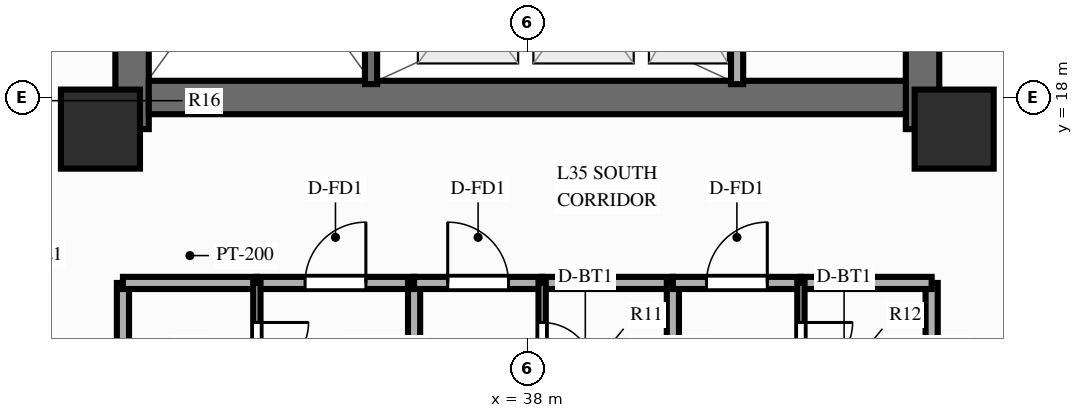
"""IFC4 building model, lengths in metres.
Left out: names, types, materials, properties, quantities, classifications, styles, units other than length and angle.
Written with IfcOpenShell. Run it as: python <this file> out.ifc"""

import sys

from ifc_helpers import new_model, si_unit, direction, frame, frame_2d, origin, origin_2d, place, context, subcontext, project, spatial, rectangle, extrude, source, transform, mapped, element, fill, save


model = new_model("IFC4")
c1 = context("Model", 3, precision=1e-05, world=origin(), true_north=direction((0.0, 1.0)))
c2 = subcontext(c1, "Body", "Model", "MODEL_VIEW")
j1 = project(units=[si_unit("LENGTHUNIT", "METRE"), si_unit("PLANEANGLEUNIT", "RADIAN")], contexts=[c1])
p1 = place(None, origin())
s1 = spatial("IfcSite", under=j1, at=p1, CompositionType="ELEMENT")
p2 = place(p1, origin())
s2 = spatial("IfcBuilding", under=s1, at=p2, CompositionType="ELEMENT")
p3 = place(p2, frame((0.0, 0.0, 110.85)))
s3 = spatial("IfcBuildingStorey", under=s2, at=p3, CompositionType="ELEMENT", Elevation=110.85)
p4 = place(p3, frame((31.5, 17.48, 0.0), z_axis=(0.0, 0.0, 1.0), x_axis=(0.0, 1.0, 0.0)))
e1 = element("IfcWall", 1, at=p4, inside=s3, PredefinedType="SHEAR", context=c2, shape_type="SweptSolid", body=[
    extrude(rectangle(XDim=19.04, YDim=0.55, at=frame_2d((9.52, 0.0))), origin(), (0.0, 0.0, 1.0), 3.0),
])
p5 = place(p4, frame((6.32, 0.0, 0.0)))
e2 = element("IfcOpeningElement", 2, at=p5, cuts=e1, PredefinedType="OPENING", context=c2, shape_type="SweptSolid", body=[
    extrude(rectangle(XDim=1.1, YDim=2.15, at=frame_2d((0.55, 1.075))), frame((0.0, 0.287, 0.0), z_axis=(0.0, -1.0, 0.0), x_axis=(1.0, 0.0, 0.0)), (0.0, 0.0, 1.0), 0.574),
])
p6 = place(p3, frame((44.5, 17.48, 0.0), z_axis=(0.0, 0.0, 1.0), x_axis=(0.0, 1.0, 0.0)))
e3 = element("IfcWall", 3, at=p6, inside=s3, PredefinedType="SHEAR", context=c2, shape_type="SweptSolid", body=[
    extrude(rectangle(XDim=19.04, YDim=0.55, at=frame_2d((9.52, 0.0))), origin(), (0.0, 0.0, 1.0), 3.0),
])
p7 = place(p6, frame((12.67, 0.0, 0.0), z_axis=(0.0, 0.0, 1.0), x_axis=(-1.0, 0.0, 0.0)))
e4 = element("IfcOpeningElement", 4, at=p7, cuts=e3, PredefinedType="OPENING", context=c2, shape_type="SweptSolid", body=[
    extrude(rectangle(XDim=1.1, YDim=2.15, at=frame_2d((0.55, 1.075))), frame((0.0, 0.287, 0.0), z_axis=(0.0, -1.0, 0.0), x_axis=(1.0, 0.0, 0.0)), (0.0, 0.0, 1.0), 0.574),
])
p8 = place(p3, frame((31.775, 18.0, 0.0), z_axis=(0.0, 0.0, 1.0), x_axis=(1.0, 0.0, 0.0)))
e5 = element("IfcWall", 5, at=p8, inside=s3, PredefinedType="SHEAR", context=c2, shape_type="SweptSolid", body=[
    extrude(rectangle(XDim=12.45, YDim=0.55, at=frame_2d((6.225, 0.0))), origin(), (0.0, 0.0, 1.0), 3.0),
])
m1 = source(origin(), c2, "Body", "SweptSolid", [
    extrude(rectangle(XDim=1.3, YDim=1.3, at=origin_2d()), origin(), (0.0, 0.0, 1.0), 3.0),
])
for number, where, z_axis, x_axis in (
    (6, (30.98, 17.48, 0.0), (0.0, 0.0, 1.0), (1.0, 0.0, 0.0)),
    (7, (45.02, 17.48, 0.0), (0.0, 0.0, 1.0), (1.0, 0.0, 0.0)),
):
    element("IfcColumn", number, at=place(p3, frame(where, z_axis=z_axis, x_axis=x_axis)), inside=s3, PredefinedType="COLUMN", context=c2, shape_type="MappedRepresentation", body=[
        mapped(m1, transform((0.0, 0.0, 0.0), scale=1.0)),
    ])
p9 = place(p3, frame((41.45, 18.22, 0.0), z_axis=(0.0, 0.0, 1.0), x_axis=(0.0, 1.0, 0.0)))
e8 = element("IfcWall", 8, at=p9, inside=s3, PredefinedType="PARTITIONING", context=c2, shape_type="SweptSolid", body=[
    extrude(rectangle(XDim=2.86, YDim=0.2, at=frame_2d((1.43, 0.0))), origin(), (0.0, 0.0, 1.0), 2.79),
])
p10 = place(p3, frame((35.43, 18.22, 0.0), z_axis=(0.0, 0.0, 1.0), x_axis=(0.0, 1.0, 0.0)))
e9 = element("IfcWall", 9, at=p10, inside=s3, PredefinedType="SOLIDWALL", context=c2, shape_type="SweptSolid", body=[
    extrude(rectangle(XDim=7.22, YDim=0.2, at=frame_2d((3.61, 0.0))), origin(), (0.0, 0.0, 1.0), 2.79),
])
p11 = place(p10, frame((6.68, 0.0, 0.0), z_axis=(0.0, 0.0, 1.0), x_axis=(-1.0, 0.0, 0.0)))
e10 = element("IfcOpeningElement", 10, at=p11, cuts=e9, PredefinedType="OPENING", context=c2, shape_type="SweptSolid", body=[
    extrude(rectangle(XDim=1.1, YDim=2.15, at=frame_2d((0.55, 1.075))), frame((0.0, 0.112, 0.0), z_axis=(0.0, -1.0, 0.0), x_axis=(1.0, 0.0, 0.0)), (0.0, 0.0, 1.0), 0.224),
])
for number, where, z_axis, x_axis in (
    (11, (31.35, 14.95, 0.0), (0.0, 0.0, 1.0), (0.0, -1.0, 0.0)),
    (12, (44.65, 14.95, 0.0), (0.0, 0.0, 1.0), (0.0, -1.0, 0.0)),
):
    element("IfcWall", number, at=place(p3, frame(where, z_axis=z_axis, x_axis=x_axis)), inside=s3, PredefinedType="PARTITIONING", context=c2, shape_type="SweptSolid", body=[
        extrude(rectangle(XDim=11.8, YDim=0.2, at=frame_2d((5.9, 0.0))), origin(), (0.0, 0.0, 1.0), 2.34),
    ])
p12 = place(p3, frame((31.35, 14.95, 0.0), z_axis=(0.0, 0.0, 1.0), x_axis=(1.0, 0.0, 0.0)))
e13 = element("IfcWall", 13, at=p12, inside=s3, PredefinedType="PARTITIONING", context=c2, shape_type="SweptSolid", body=[
    extrude(rectangle(XDim=2.202, YDim=0.2, at=frame_2d((1.101, 0.0))), origin(), (0.0, 0.0, 1.0), 2.79),
])
p13 = place(p3, frame((33.552, 14.95, 0.0), z_axis=(0.0, 0.0, 1.0), x_axis=(1.0, 0.0, 0.0)))
e14 = element("IfcWall", 14, at=p13, inside=s3, PredefinedType="PARTITIONING", context=c2, shape_type="SweptSolid", body=[
    extrude(rectangle(XDim=2.585, YDim=0.2, at=frame_2d((1.293, 0.0))), origin(), (0.0, 0.0, 1.0), 2.79),
])
p14 = place(p13, frame((0.793, 0.0, 0.0)))
e15 = element("IfcOpeningElement", 15, at=p14, cuts=e14, PredefinedType="OPENING", context=c2, shape_type="SweptSolid", body=[
    extrude(rectangle(XDim=1.0, YDim=2.15, at=frame_2d((0.5, 1.075))), frame((0.0, 0.112, 0.0), z_axis=(0.0, -1.0, 0.0), x_axis=(1.0, 0.0, 0.0)), (0.0, 0.0, 1.0), 0.224),
])
p15 = place(p3, frame((33.552, 14.95, 0.0), z_axis=(0.0, 0.0, 1.0), x_axis=(0.0, -1.0, 0.0)))
e16 = element("IfcWall", 16, at=p15, inside=s3, PredefinedType="PARTITIONING", context=c2, shape_type="SweptSolid", body=[
    extrude(rectangle(XDim=2.15, YDim=0.12, at=frame_2d((1.075, 0.0))), origin(), (0.0, 0.0, 1.0), 2.79),
])
p16 = place(p15, frame((0.65, 0.0, 0.0)))
e17 = element("IfcOpeningElement", 17, at=p16, cuts=e16, PredefinedType="OPENING", context=c2, shape_type="SweptSolid", body=[
    extrude(rectangle(XDim=0.85, YDim=2.05, at=frame_2d((0.425, 1.025))), frame((0.0, 0.072, 0.0), z_axis=(0.0, -1.0, 0.0), x_axis=(1.0, 0.0, 0.0)), (0.0, 0.0, 1.0), 0.144),
])
p17 = place(p3, frame((36.138, 14.95, 0.0), z_axis=(0.0, 0.0, 1.0), x_axis=(0.0, -1.0, 0.0)))
e18 = element("IfcWall", 18, at=p17, inside=s3, PredefinedType="PARTITIONING", context=c2, shape_type="SweptSolid", body=[
    extrude(rectangle(XDim=11.8, YDim=0.2, at=frame_2d((5.9, 0.0))), origin(), (0.0, 0.0, 1.0), 2.79),
])
p18 = place(p3, frame((36.138, 14.95, 0.0), z_axis=(0.0, 0.0, 1.0), x_axis=(1.0, 0.0, 0.0)))
e19 = element("IfcWall", 19, at=p18, inside=s3, PredefinedType="PARTITIONING", context=c2, shape_type="SweptSolid", body=[
    extrude(rectangle(XDim=2.106, YDim=0.2, at=frame_2d((1.053, 0.0))), origin(), (0.0, 0.0, 1.0), 2.79),
])
p19 = place(p18, frame((0.553, 0.0, 0.0)))
e20 = element("IfcOpeningElement", 20, at=p19, cuts=e19, PredefinedType="OPENING", context=c2, shape_type="SweptSolid", body=[
    extrude(rectangle(XDim=1.0, YDim=2.15, at=frame_2d((0.5, 1.075))), frame((0.0, 0.112, 0.0), z_axis=(0.0, -1.0, 0.0), x_axis=(1.0, 0.0, 0.0)), (0.0, 0.0, 1.0), 0.224),
])
p20 = place(p3, frame((38.244, 14.95, 0.0), z_axis=(0.0, 0.0, 1.0), x_axis=(1.0, 0.0, 0.0)))
e21 = element("IfcWall", 21, at=p20, inside=s3, PredefinedType="PARTITIONING", context=c2, shape_type="SweptSolid", body=[
    extrude(rectangle(XDim=2.15, YDim=0.2, at=frame_2d((1.075, 0.0))), origin(), (0.0, 0.0, 1.0), 2.79),
])
p21 = place(p3, frame((38.244, 14.95, 0.0), z_axis=(0.0, 0.0, 1.0), x_axis=(0.0, -1.0, 0.0)))
e22 = element("IfcWall", 22, at=p21, inside=s3, PredefinedType="PARTITIONING", context=c2, shape_type="SweptSolid", body=[
    extrude(rectangle(XDim=2.15, YDim=0.12, at=frame_2d((1.075, 0.0))), origin(), (0.0, 0.0, 1.0), 2.79),
])
p22 = place(p21, frame((0.65, 0.0, 0.0)))
e23 = element("IfcOpeningElement", 23, at=p22, cuts=e22, PredefinedType="OPENING", context=c2, shape_type="SweptSolid", body=[
    extrude(rectangle(XDim=0.85, YDim=2.05, at=frame_2d((0.425, 1.025))), frame((0.0, 0.072, 0.0), z_axis=(0.0, -1.0, 0.0), x_axis=(1.0, 0.0, 0.0)), (0.0, 0.0, 1.0), 0.144),
])
p23 = place(p3, frame((40.394, 14.95, 0.0), z_axis=(0.0, 0.0, 1.0), x_axis=(0.0, -1.0, 0.0)))
e24 = element("IfcWall", 24, at=p23, inside=s3, PredefinedType="PARTITIONING", context=c2, shape_type="SweptSolid", body=[
    extrude(rectangle(XDim=11.8, YDim=0.2, at=frame_2d((5.9, 0.0))), origin(), (0.0, 0.0, 1.0), 2.79),
])
p24 = place(p3, frame((40.394, 14.95, 0.0), z_axis=(0.0, 0.0, 1.0), x_axis=(1.0, 0.0, 0.0)))
e25 = element("IfcWall", 25, at=p24, inside=s3, PredefinedType="PARTITIONING", context=c2, shape_type="SweptSolid", body=[
    extrude(rectangle(XDim=2.106, YDim=0.2, at=frame_2d((1.053, 0.0))), origin(), (0.0, 0.0, 1.0), 2.79),
])
p25 = place(p24, frame((0.553, 0.0, 0.0)))
e26 = element("IfcOpeningElement", 26, at=p25, cuts=e25, PredefinedType="OPENING", context=c2, shape_type="SweptSolid", body=[
    extrude(rectangle(XDim=1.0, YDim=2.15, at=frame_2d((0.5, 1.075))), frame((0.0, 0.112, 0.0), z_axis=(0.0, -1.0, 0.0), x_axis=(1.0, 0.0, 0.0)), (0.0, 0.0, 1.0), 0.224),
])
p26 = place(p3, frame((42.5, 14.95, 0.0), z_axis=(0.0, 0.0, 1.0), x_axis=(1.0, 0.0, 0.0)))
e27 = element("IfcWall", 27, at=p26, inside=s3, PredefinedType="PARTITIONING", context=c2, shape_type="SweptSolid", body=[
    extrude(rectangle(XDim=2.15, YDim=0.2, at=frame_2d((1.075, 0.0))), origin(), (0.0, 0.0, 1.0), 2.79),
])
p27 = place(p3, frame((42.5, 14.95, 0.0), z_axis=(0.0, 0.0, 1.0), x_axis=(0.0, -1.0, 0.0)))
e28 = element("IfcWall", 28, at=p27, inside=s3, PredefinedType="PARTITIONING", context=c2, shape_type="SweptSolid", body=[
    extrude(rectangle(XDim=2.15, YDim=0.12, at=frame_2d((1.075, 0.0))), origin(), (0.0, 0.0, 1.0), 2.79),
])
p28 = place(p27, frame((0.65, 0.0, 0.0)))
e29 = element("IfcOpeningElement", 29, at=p28, cuts=e28, PredefinedType="OPENING", context=c2, shape_type="SweptSolid", body=[
    extrude(rectangle(XDim=0.85, YDim=2.05, at=frame_2d((0.425, 1.025))), frame((0.0, 0.072, 0.0), z_axis=(0.0, -1.0, 0.0), x_axis=(1.0, 0.0, 0.0)), (0.0, 0.0, 1.0), 0.144),
])
m2 = source(origin(), c2, "Body", "SweptSolid", [
    extrude(rectangle(XDim=1.0, YDim=2.15, at=frame_2d((0.5, 1.075))), frame((0.0, 0.025, 0.0), z_axis=(0.0, -1.0, 0.0), x_axis=(1.0, 0.0, 0.0)), (0.0, 0.0, 1.0), 0.05),
])
p29 = place(p14, origin())
e30 = element("IfcDoor", 30, at=p29, inside=s3, OperationType="SINGLE_SWING_RIGHT", PredefinedType="DOOR", context=c2, shape_type="MappedRepresentation", body=[
    mapped(m2, transform((0.0, 0.0, 0.0), scale=1.0)),
])
fill(e15, e30)
m3 = source(origin(), c2, "Body", "SweptSolid", [
    extrude(rectangle(XDim=0.85, YDim=2.05, at=frame_2d((0.425, 1.025))), frame((0.0, 0.025, 0.0), z_axis=(0.0, -1.0, 0.0), x_axis=(1.0, 0.0, 0.0)), (0.0, 0.0, 1.0), 0.05),
])
p30 = place(p16, origin())
e31 = element("IfcDoor", 31, at=p30, inside=s3, OperationType="SINGLE_SWING_LEFT", PredefinedType="DOOR", context=c2, shape_type="MappedRepresentation", body=[
    mapped(m3, transform((0.0, 0.0, 0.0), scale=1.0)),
])
fill(e17, e31)
p31 = place(p19, origin())
e32 = element("IfcDoor", 32, at=p31, inside=s3, OperationType="SINGLE_SWING_LEFT", PredefinedType="DOOR", context=c2, shape_type="MappedRepresentation", body=[
    mapped(m2, transform((0.0, 0.0, 0.0), scale=1.0)),
])
fill(e20, e32)
p32 = place(p22, origin())
e33 = element("IfcDoor", 33, at=p32, inside=s3, OperationType="SINGLE_SWING_RIGHT", PredefinedType="DOOR", context=c2, shape_type="MappedRepresentation", body=[
    mapped(m3, transform((0.0, 0.0, 0.0), scale=1.0)),
])
fill(e23, e33)
p33 = place(p25, origin())
e34 = element("IfcDoor", 34, at=p33, inside=s3, OperationType="SINGLE_SWING_RIGHT", PredefinedType="DOOR", context=c2, shape_type="MappedRepresentation", body=[
    mapped(m2, transform((0.0, 0.0, 0.0), scale=1.0)),
])
fill(e26, e34)
p34 = place(p28, origin())
e35 = element("IfcDoor", 35, at=p34, inside=s3, OperationType="SINGLE_SWING_LEFT", PredefinedType="DOOR", context=c2, shape_type="MappedRepresentation", body=[
    mapped(m3, transform((0.0, 0.0, 0.0), scale=1.0)),
])
fill(e29, e35)
save(model, sys.argv[1])
